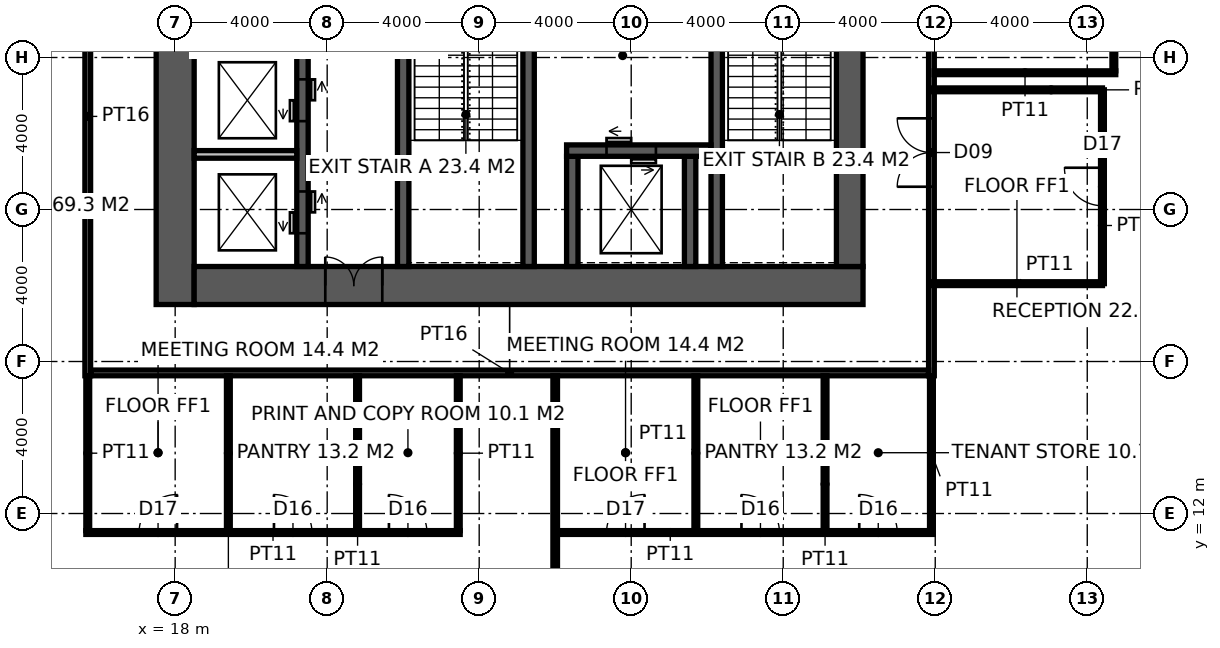
"""IFC4 building model, lengths in metres.
Left out: names, types, materials, properties, quantities, classifications, styles, units other than length and angle.
Written with IfcOpenShell. Run it as: python <this file> out.ifc"""

import sys

from ifc_helpers import new_model, si_unit, direction, frame, frame_2d, origin, place, context, subcontext, project, spatial, rectangle, extrude, element, fill, save


model = new_model("IFC4")
c1 = context("Model", 3, precision=1e-05, world=origin(), true_north=direction((0.0, 1.0)))
c2 = subcontext(c1, "Body", "Model", "MODEL_VIEW")
j1 = project(units=[si_unit("LENGTHUNIT", "METRE"), si_unit("PLANEANGLEUNIT", "RADIAN")], contexts=[c1])
p1 = place(None, origin())
s1 = spatial("IfcSite", under=j1, at=p1, CompositionType="ELEMENT")
p2 = place(p1, origin())
s2 = spatial("IfcBuilding", under=s1, at=p2, CompositionType="ELEMENT")
p3 = place(p2, frame((0.0, 0.0, 93.4)))
s3 = spatial("IfcBuildingStorey", under=s2, at=p3, CompositionType="ELEMENT", Elevation=93.4)
p4 = place(p3, frame((18.0, 17.5, -0.15), z_axis=(0.0, 0.0, 1.0), x_axis=(0.0, 1.0, 0.0)))
e1 = element("IfcWall", 1, at=p4, inside=s3, PredefinedType="SHEAR", context=c2, shape_type="SweptSolid", body=[
    extrude(rectangle(XDim=19.0, YDim=1.0, at=frame_2d((9.5, 0.0))), origin(), (0.0, 0.0, 1.0), 4.0),
])
p5 = place(p3, frame((18.5, 18.0, -0.15), z_axis=(0.0, 0.0, 1.0), x_axis=(1.0, 0.0, 0.0)))
e2 = element("IfcWall", 2, at=p5, inside=s3, PredefinedType="SHEAR", context=c2, shape_type="SweptSolid", body=[
    extrude(rectangle(XDim=17.6, YDim=1.0, at=frame_2d((8.8, 0.0))), origin(), (0.0, 0.0, 1.0), 4.0),
])
p6 = place(p5, frame((3.45, 0.0, 0.15)))
e3 = element("IfcOpeningElement", 3, at=p6, cuts=e2, PredefinedType="OPENING", context=c2, shape_type="SweptSolid", body=[
    extrude(rectangle(XDim=1.5, YDim=2.4, at=frame_2d((0.75, 1.2))), frame((0.0, 0.51, 0.0), z_axis=(0.0, -1.0, 0.0), x_axis=(1.0, 0.0, 0.0)), (0.0, 0.0, 1.0), 1.02),
])
p7 = place(p3, frame((35.75, 18.5, -0.15), z_axis=(0.0, 0.0, 1.0), x_axis=(0.0, 1.0, 0.0)))
e4 = element("IfcWall", 4, at=p7, inside=s3, PredefinedType="SHEAR", context=c2, shape_type="SweptSolid", body=[
    extrude(rectangle(XDim=17.0, YDim=0.7, at=frame_2d((8.5, 0.0))), origin(), (0.0, 0.0, 1.0), 4.0),
])
p8 = place(p7, frame((9.85, 0.0, 0.15)))
e5 = element("IfcOpeningElement", 5, at=p8, cuts=e4, PredefinedType="OPENING", context=c2, shape_type="SweptSolid", body=[
    extrude(rectangle(XDim=1.0, YDim=2.2, at=frame_2d((0.5, 1.1))), frame((0.0, 0.36, 0.0), z_axis=(0.0, -1.0, 0.0), x_axis=(1.0, 0.0, 0.0)), (0.0, 0.0, 1.0), 0.72),
])
p9 = place(p3, frame((24.0, 18.5, -0.15), z_axis=(0.0, 0.0, 1.0), x_axis=(0.0, 1.0, 0.0)))
e6 = element("IfcWall", 6, at=p9, inside=s3, PredefinedType="SHEAR", context=c2, shape_type="SweptSolid", body=[
    extrude(rectangle(XDim=17.0, YDim=0.3, at=frame_2d((8.5, 0.0))), origin(), (0.0, 0.0, 1.0), 4.0),
])
p10 = place(p9, frame((9.6, 0.0, 0.15)))
e7 = element("IfcOpeningElement", 7, at=p10, cuts=e6, PredefinedType="OPENING", context=c2, shape_type="SweptSolid", body=[
    extrude(rectangle(XDim=1.5, YDim=2.4, at=frame_2d((0.75, 1.2))), frame((0.0, 0.16, 0.0), z_axis=(0.0, -1.0, 0.0), x_axis=(1.0, 0.0, 0.0)), (0.0, 0.0, 1.0), 0.32),
])
p11 = place(p3, frame((27.3, 18.5, -0.15), z_axis=(0.0, 0.0, 1.0), x_axis=(0.0, 1.0, 0.0)))
e8 = element("IfcWall", 8, at=p11, inside=s3, PredefinedType="SHEAR", context=c2, shape_type="SweptSolid", body=[
    extrude(rectangle(XDim=7.9, YDim=0.3, at=frame_2d((3.95, 0.0))), origin(), (0.0, 0.0, 1.0), 4.0),
])
p12 = place(p11, frame((6.4, 0.0, 0.15)))
e9 = element("IfcOpeningElement", 9, at=p12, cuts=e8, PredefinedType="OPENING", context=c2, shape_type="SweptSolid", body=[
    extrude(rectangle(XDim=1.0, YDim=2.2, at=frame_2d((0.5, 1.1))), frame((0.0, 0.16, 0.0), z_axis=(0.0, -1.0, 0.0), x_axis=(1.0, 0.0, 0.0)), (0.0, 0.0, 1.0), 0.32),
])
p13 = place(p3, frame((32.25, 18.5, -0.15), z_axis=(0.0, 0.0, 1.0), x_axis=(0.0, 1.0, 0.0)))
e10 = element("IfcWall", 10, at=p13, inside=s3, PredefinedType="SHEAR", context=c2, shape_type="SweptSolid", body=[
    extrude(rectangle(XDim=7.9, YDim=0.3, at=frame_2d((3.95, 0.0))), origin(), (0.0, 0.0, 1.0), 4.0),
])
for number, where, z_axis, x_axis in (
    (11, (28.45, 18.5, -0.15), (0.0, 0.0, 1.0), (0.0, 1.0, 0.0)),
    (12, (31.55, 18.5, -0.15), (0.0, 0.0, 1.0), (0.0, 1.0, 0.0)),
):
    element("IfcWall", number, at=place(p3, frame(where, z_axis=z_axis, x_axis=x_axis)), inside=s3, PredefinedType="SHEAR", context=c2, shape_type="SweptSolid", body=[
        extrude(rectangle(XDim=2.9, YDim=0.3, at=frame_2d((1.45, 0.0))), origin(), (0.0, 0.0, 1.0), 4.0),
    ])
p14 = place(p3, frame((28.3, 21.55, -0.15), z_axis=(0.0, 0.0, 1.0), x_axis=(1.0, 0.0, 0.0)))
e13 = element("IfcWall", 13, at=p14, inside=s3, PredefinedType="SHEAR", context=c2, shape_type="SweptSolid", body=[
    extrude(rectangle(XDim=3.8, YDim=0.3, at=frame_2d((1.9, 0.0))), origin(), (0.0, 0.0, 1.0), 4.0),
])
p15 = place(p14, frame((1.05, 0.0, 0.15)))
e14 = element("IfcOpeningElement", 14, at=p15, cuts=e13, PredefinedType="OPENING", context=c2, shape_type="SweptSolid", body=[
    extrude(rectangle(XDim=1.3, YDim=2.4, at=frame_2d((0.65, 1.2))), frame((0.0, 0.16, 0.0), z_axis=(0.0, -1.0, 0.0), x_axis=(1.0, 0.0, 0.0)), (0.0, 0.0, 1.0), 0.32),
])
p16 = place(p3, frame((21.35, 18.5, -0.15), z_axis=(0.0, 0.0, 1.0), x_axis=(0.0, 1.0, 0.0)))
e15 = element("IfcWall", 15, at=p16, inside=s3, PredefinedType="SHEAR", context=c2, shape_type="SweptSolid", body=[
    extrude(rectangle(XDim=12.5, YDim=0.3, at=frame_2d((6.25, 0.0))), origin(), (0.0, 0.0, 1.0), 4.0),
])
p17 = place(p16, frame((0.875, 0.0, 0.15)))
e16 = element("IfcOpeningElement", 16, at=p17, cuts=e15, PredefinedType="OPENING", context=c2, shape_type="SweptSolid", body=[
    extrude(rectangle(XDim=1.1, YDim=2.2, at=frame_2d((0.55, 1.1))), frame((0.0, 0.16, 0.0), z_axis=(0.0, -1.0, 0.0), x_axis=(1.0, 0.0, 0.0)), (0.0, 0.0, 1.0), 0.32),
])
p18 = place(p16, frame((3.825, 0.0, 0.15)))
e17 = element("IfcOpeningElement", 17, at=p18, cuts=e15, PredefinedType="OPENING", context=c2, shape_type="SweptSolid", body=[
    extrude(rectangle(XDim=1.1, YDim=2.2, at=frame_2d((0.55, 1.1))), frame((0.0, 0.16, 0.0), z_axis=(0.0, -1.0, 0.0), x_axis=(1.0, 0.0, 0.0)), (0.0, 0.0, 1.0), 0.32),
])
p19 = place(p16, frame((6.675, 0.0, 0.15)))
e18 = element("IfcOpeningElement", 18, at=p19, cuts=e15, PredefinedType="OPENING", context=c2, shape_type="SweptSolid", body=[
    extrude(rectangle(XDim=1.1, YDim=2.2, at=frame_2d((0.55, 1.1))), frame((0.0, 0.16, 0.0), z_axis=(0.0, -1.0, 0.0), x_axis=(1.0, 0.0, 0.0)), (0.0, 0.0, 1.0), 0.32),
])
p20 = place(p16, frame((9.575, 0.0, 0.15)))
e19 = element("IfcOpeningElement", 19, at=p20, cuts=e15, PredefinedType="OPENING", context=c2, shape_type="SweptSolid", body=[
    extrude(rectangle(XDim=1.1, YDim=2.2, at=frame_2d((0.55, 1.1))), frame((0.0, 0.16, 0.0), z_axis=(0.0, -1.0, 0.0), x_axis=(1.0, 0.0, 0.0)), (0.0, 0.0, 1.0), 0.32),
])
p21 = place(p3, frame((18.5, 21.45, -0.15), z_axis=(0.0, 0.0, 1.0), x_axis=(1.0, 0.0, 0.0)))
e20 = element("IfcWall", 20, at=p21, inside=s3, PredefinedType="SOLIDWALL", context=c2, shape_type="SweptSolid", body=[
    extrude(rectangle(XDim=2.7, YDim=0.2, at=frame_2d((1.35, 0.0))), origin(), (0.0, 0.0, 1.0), 4.0),
])
p22 = place(p3, frame((15.7, 15.625, 0.0), z_axis=(0.0, 0.0, 1.0), x_axis=(0.0, 1.0, 0.0)))
e21 = element("IfcWall", 21, at=p22, inside=s3, PredefinedType="PARTITIONING", context=c2, shape_type="SweptSolid", body=[
    extrude(rectangle(XDim=22.75, YDim=0.15, at=frame_2d((11.375, 0.0))), origin(), (0.0, 0.0, 1.0), 3.85),
])
p23 = place(p22, frame((10.475, 0.0, 0.0)))
e22 = element("IfcOpeningElement", 22, at=p23, cuts=e21, PredefinedType="OPENING", context=c2, shape_type="SweptSolid", body=[
    extrude(rectangle(XDim=1.8, YDim=2.4, at=frame_2d((0.9, 1.2))), frame((0.0, 0.085, 0.0), z_axis=(0.0, -1.0, 0.0), x_axis=(1.0, 0.0, 0.0)), (0.0, 0.0, 1.0), 0.17),
])
p24 = place(p3, frame((37.9, 15.625, 0.0), z_axis=(0.0, 0.0, 1.0), x_axis=(0.0, 1.0, 0.0)))
e23 = element("IfcWall", 23, at=p24, inside=s3, PredefinedType="PARTITIONING", context=c2, shape_type="SweptSolid", body=[
    extrude(rectangle(XDim=22.75, YDim=0.15, at=frame_2d((11.375, 0.0))), origin(), (0.0, 0.0, 1.0), 2.95),
])
p25 = place(p24, frame((4.974, 0.0, 0.0)))
e24 = element("IfcOpeningElement", 24, at=p25, cuts=e23, PredefinedType="OPENING", context=c2, shape_type="SweptSolid", body=[
    extrude(rectangle(XDim=1.8, YDim=2.4, at=frame_2d((0.9, 1.2))), frame((0.0, 0.085, 0.0), z_axis=(0.0, -1.0, 0.0), x_axis=(1.0, 0.0, 0.0)), (0.0, 0.0, 1.0), 0.17),
])
p26 = place(p24, frame((16.226, 0.0, 0.0)))
e25 = element("IfcOpeningElement", 25, at=p26, cuts=e23, PredefinedType="OPENING", context=c2, shape_type="SweptSolid", body=[
    extrude(rectangle(XDim=1.8, YDim=2.4, at=frame_2d((0.9, 1.2))), frame((0.0, 0.085, 0.0), z_axis=(0.0, -1.0, 0.0), x_axis=(1.0, 0.0, 0.0)), (0.0, 0.0, 1.0), 0.17),
])
p27 = place(p3, frame((15.775, 15.7, 0.0), z_axis=(0.0, 0.0, 1.0), x_axis=(1.0, 0.0, 0.0)))
e26 = element("IfcWall", 26, at=p27, inside=s3, PredefinedType="PARTITIONING", context=c2, shape_type="SweptSolid", body=[
    extrude(rectangle(XDim=22.05, YDim=0.15, at=frame_2d((11.025, 0.0))), origin(), (0.0, 0.0, 1.0), 3.85),
])
p28 = place(p3, frame((28.0, 0.3, 0.0), z_axis=(0.0, 0.0, 1.0), x_axis=(0.0, 1.0, 0.0)))
e27 = element("IfcWall", 27, at=p28, inside=s3, PredefinedType="PARTITIONING", context=c2, shape_type="SweptSolid", body=[
    extrude(rectangle(XDim=15.325, YDim=0.12, at=frame_2d((7.663, 0.0))), origin(), (0.0, 0.0, 1.0), 3.85),
])
p29 = place(p3, frame((15.65, 11.5, 0.0), z_axis=(0.0, 0.0, 1.0), x_axis=(1.0, 0.0, 0.0)))
e28 = element("IfcWall", 28, at=p29, inside=s3, PredefinedType="PARTITIONING", context=c2, shape_type="SweptSolid", body=[
    extrude(rectangle(XDim=9.85, YDim=0.1, at=frame_2d((4.925, 0.0))), origin(), (0.0, 0.0, 1.0), 3.85),
])
p30 = place(p29, frame((1.4, 0.0, 0.0)))
e29 = element("IfcOpeningElement", 29, at=p30, cuts=e28, PredefinedType="OPENING", context=c2, shape_type="SweptSolid", body=[
    extrude(rectangle(XDim=1.0, YDim=2.2, at=frame_2d((0.5, 1.1))), frame((0.0, 0.06, 0.0), z_axis=(0.0, -1.0, 0.0), x_axis=(1.0, 0.0, 0.0)), (0.0, 0.0, 1.0), 0.12),
])
p31 = place(p29, frame((4.95, 0.0, 0.0)))
e30 = element("IfcOpeningElement", 30, at=p31, cuts=e28, PredefinedType="OPENING", context=c2, shape_type="SweptSolid", body=[
    extrude(rectangle(XDim=1.0, YDim=2.2, at=frame_2d((0.5, 1.1))), frame((0.0, 0.06, 0.0), z_axis=(0.0, -1.0, 0.0), x_axis=(1.0, 0.0, 0.0)), (0.0, 0.0, 1.0), 0.12),
])
p32 = place(p29, frame((7.975, 0.0, 0.0)))
e31 = element("IfcOpeningElement", 31, at=p32, cuts=e28, PredefinedType="OPENING", context=c2, shape_type="SweptSolid", body=[
    extrude(rectangle(XDim=1.0, YDim=2.2, at=frame_2d((0.5, 1.1))), frame((0.0, 0.06, 0.0), z_axis=(0.0, -1.0, 0.0), x_axis=(1.0, 0.0, 0.0)), (0.0, 0.0, 1.0), 0.12),
])
p33 = place(p3, frame((28.061, 11.5, 0.0), z_axis=(0.0, 0.0, 1.0), x_axis=(1.0, 0.0, 0.0)))
e32 = element("IfcWall", 32, at=p33, inside=s3, PredefinedType="PARTITIONING", context=c2, shape_type="SweptSolid", body=[
    extrude(rectangle(XDim=9.889, YDim=0.1, at=frame_2d((4.944, 0.0))), origin(), (0.0, 0.0, 1.0), 3.85),
])
p34 = place(p33, frame((1.29, 0.0, 0.0)))
e33 = element("IfcOpeningElement", 33, at=p34, cuts=e32, PredefinedType="OPENING", context=c2, shape_type="SweptSolid", body=[
    extrude(rectangle(XDim=1.0, YDim=2.2, at=frame_2d((0.5, 1.1))), frame((0.0, 0.06, 0.0), z_axis=(0.0, -1.0, 0.0), x_axis=(1.0, 0.0, 0.0)), (0.0, 0.0, 1.0), 0.12),
])
p35 = place(p33, frame((4.84, 0.0, 0.0)))
e34 = element("IfcOpeningElement", 34, at=p35, cuts=e32, PredefinedType="OPENING", context=c2, shape_type="SweptSolid", body=[
    extrude(rectangle(XDim=1.0, YDim=2.2, at=frame_2d((0.5, 1.1))), frame((0.0, 0.06, 0.0), z_axis=(0.0, -1.0, 0.0), x_axis=(1.0, 0.0, 0.0)), (0.0, 0.0, 1.0), 0.12),
])
p36 = place(p33, frame((7.939, 0.0, 0.0)))
e35 = element("IfcOpeningElement", 35, at=p36, cuts=e32, PredefinedType="OPENING", context=c2, shape_type="SweptSolid", body=[
    extrude(rectangle(XDim=1.0, YDim=2.2, at=frame_2d((0.5, 1.1))), frame((0.0, 0.06, 0.0), z_axis=(0.0, -1.0, 0.0), x_axis=(1.0, 0.0, 0.0)), (0.0, 0.0, 1.0), 0.12),
])
p37 = place(p3, frame((37.975, 23.599, 0.0), z_axis=(0.0, 0.0, 1.0), x_axis=(1.0, 0.0, 0.0)))
e36 = element("IfcWall", 36, at=p37, inside=s3, PredefinedType="PARTITIONING", context=c2, shape_type="SweptSolid", body=[
    extrude(rectangle(XDim=4.775, YDim=0.1, at=frame_2d((2.387, 0.0))), origin(), (0.0, 0.0, 1.0), 2.95),
])
for number, where, z_axis, x_axis in (
    (37, (15.7, 11.55, 0.0), (0.0, 0.0, 1.0), (0.0, 1.0, 0.0)),
    (38, (19.4, 11.55, 0.0), (0.0, 0.0, 1.0), (0.0, 1.0, 0.0)),
    (39, (22.8, 11.55, 0.0), (0.0, 0.0, 1.0), (0.0, 1.0, 0.0)),
    (40, (25.45, 11.55, 0.0), (0.0, 0.0, 1.0), (0.0, 1.0, 0.0)),
    (41, (31.701, 11.55, 0.0), (0.0, 0.0, 1.0), (0.0, 1.0, 0.0)),
    (42, (35.101, 11.55, 0.0), (0.0, 0.0, 1.0), (0.0, 1.0, 0.0)),
):
    element("IfcWall", number, at=place(p3, frame(where, z_axis=z_axis, x_axis=x_axis)), inside=s3, PredefinedType="PARTITIONING", context=c2, shape_type="SweptSolid", body=[
        extrude(rectangle(XDim=4.075, YDim=0.1, at=frame_2d((2.038, 0.0))), origin(), (0.0, 0.0, 1.0), 3.85),
    ])
p38 = place(p3, frame((37.9, 11.55, 0.0), z_axis=(0.0, 0.0, 1.0), x_axis=(0.0, 1.0, 0.0)))
e43 = element("IfcWall", 43, at=p38, inside=s3, PredefinedType="PARTITIONING", context=c2, shape_type="SweptSolid", body=[
    extrude(rectangle(XDim=4.075, YDim=0.1, at=frame_2d((2.038, 0.0))), origin(), (0.0, 0.0, 1.0), 2.95),
])
p39 = place(p3, frame((42.7, 23.649, 0.0), z_axis=(0.0, 0.0, 1.0), x_axis=(0.0, 1.0, 0.0)))
e44 = element("IfcWall", 44, at=p39, inside=s3, PredefinedType="PARTITIONING", context=c2, shape_type="SweptSolid", body=[
    extrude(rectangle(XDim=3.54, YDim=0.1, at=frame_2d((1.77, 0.0))), origin(), (0.0, 0.0, 1.0), 3.85),
])
p40 = place(p39, frame((1.275, 0.0, 0.0)))
e45 = element("IfcOpeningElement", 45, at=p40, cuts=e44, PredefinedType="OPENING", context=c2, shape_type="SweptSolid", body=[
    extrude(rectangle(XDim=1.0, YDim=2.2, at=frame_2d((0.5, 1.1))), frame((0.0, 0.06, 0.0), z_axis=(0.0, -1.0, 0.0), x_axis=(1.0, 0.0, 0.0)), (0.0, 0.0, 1.0), 0.12),
])
p41 = place(p3, frame((37.9, 18.049, 0.0), z_axis=(0.0, 0.0, 1.0), x_axis=(1.0, 0.0, 0.0)))
e46 = element("IfcWall", 46, at=p41, inside=s3, PredefinedType="PARTITIONING", context=c2, shape_type="SweptSolid", body=[
    extrude(rectangle(XDim=4.5, YDim=0.1, at=frame_2d((2.25, 0.0))), origin(), (0.0, 0.0, 1.0), 3.85),
])
p42 = place(p3, frame((42.4, 18.049, 0.0), z_axis=(0.0, 0.0, 1.0), x_axis=(0.0, 1.0, 0.0)))
e47 = element("IfcWall", 47, at=p42, inside=s3, PredefinedType="PARTITIONING", context=c2, shape_type="SweptSolid", body=[
    extrude(rectangle(XDim=5.1, YDim=0.1, at=frame_2d((2.55, 0.0))), origin(), (0.0, 0.0, 1.0), 3.85),
])
p43 = place(p42, frame((2.05, 0.0, 0.0)))
e48 = element("IfcOpeningElement", 48, at=p43, cuts=e47, PredefinedType="OPENING", context=c2, shape_type="SweptSolid", body=[
    extrude(rectangle(XDim=1.0, YDim=2.2, at=frame_2d((0.5, 1.1))), frame((0.0, 0.06, 0.0), z_axis=(0.0, -1.0, 0.0), x_axis=(1.0, 0.0, 0.0)), (0.0, 0.0, 1.0), 0.12),
])
p44 = place(p3, frame((42.4, 23.149, 0.0), z_axis=(0.0, 0.0, 1.0), x_axis=(-1.0, 0.0, 0.0)))
e49 = element("IfcWall", 49, at=p44, inside=s3, PredefinedType="PARTITIONING", context=c2, shape_type="SweptSolid", body=[
    extrude(rectangle(XDim=4.5, YDim=0.1, at=frame_2d((2.25, 0.0))), origin(), (0.0, 0.0, 1.0), 3.85),
])
p45 = place(p6, origin())
e50 = element("IfcDoor", 50, at=p45, inside=s3, OperationType="DOUBLE_DOOR_DOUBLE_SWING", PredefinedType="DOOR", context=c2, shape_type="SweptSolid", body=[
    extrude(rectangle(XDim=1.5, YDim=2.4, at=frame_2d((0.75, 1.2))), frame((0.0, 0.025, 0.0), z_axis=(0.0, -1.0, 0.0), x_axis=(1.0, 0.0, 0.0)), (0.0, 0.0, 1.0), 0.05),
])
fill(e3, e50)
p46 = place(p25, origin())
e51 = element("IfcDoor", 51, at=p46, inside=s3, OperationType="DOUBLE_DOOR_DOUBLE_SWING", PredefinedType="DOOR", context=c2, shape_type="SweptSolid", body=[
    extrude(rectangle(XDim=1.8, YDim=2.4, at=frame_2d((0.9, 1.2))), frame((0.0, 0.025, 0.0), z_axis=(0.0, -1.0, 0.0), x_axis=(1.0, 0.0, 0.0)), (0.0, 0.0, 1.0), 0.05),
])
fill(e24, e51)
p47 = place(p30, origin())
e52 = element("IfcDoor", 52, at=p47, inside=s3, OperationType="SINGLE_SWING_RIGHT", PredefinedType="DOOR", context=c2, shape_type="SweptSolid", body=[
    extrude(rectangle(XDim=1.0, YDim=2.2, at=frame_2d((0.5, 1.1))), frame((0.0, 0.025, 0.0), z_axis=(0.0, -1.0, 0.0), x_axis=(1.0, 0.0, 0.0)), (0.0, 0.0, 1.0), 0.05),
])
fill(e29, e52)
p48 = place(p31, origin())
e53 = element("IfcDoor", 53, at=p48, inside=s3, OperationType="SINGLE_SWING_LEFT", PredefinedType="DOOR", context=c2, shape_type="SweptSolid", body=[
    extrude(rectangle(XDim=1.0, YDim=2.2, at=frame_2d((0.5, 1.1))), frame((0.0, 0.025, 0.0), z_axis=(0.0, -1.0, 0.0), x_axis=(1.0, 0.0, 0.0)), (0.0, 0.0, 1.0), 0.05),
])
fill(e30, e53)
p49 = place(p32, origin())
e54 = element("IfcDoor", 54, at=p49, inside=s3, OperationType="SINGLE_SWING_LEFT", PredefinedType="DOOR", context=c2, shape_type="SweptSolid", body=[
    extrude(rectangle(XDim=1.0, YDim=2.2, at=frame_2d((0.5, 1.1))), frame((0.0, 0.025, 0.0), z_axis=(0.0, -1.0, 0.0), x_axis=(1.0, 0.0, 0.0)), (0.0, 0.0, 1.0), 0.05),
])
fill(e31, e54)
p50 = place(p34, origin())
e55 = element("IfcDoor", 55, at=p50, inside=s3, OperationType="SINGLE_SWING_RIGHT", PredefinedType="DOOR", context=c2, shape_type="SweptSolid", body=[
    extrude(rectangle(XDim=1.0, YDim=2.2, at=frame_2d((0.5, 1.1))), frame((0.0, 0.025, 0.0), z_axis=(0.0, -1.0, 0.0), x_axis=(1.0, 0.0, 0.0)), (0.0, 0.0, 1.0), 0.05),
])
fill(e33, e55)
p51 = place(p35, origin())
e56 = element("IfcDoor", 56, at=p51, inside=s3, OperationType="SINGLE_SWING_LEFT", PredefinedType="DOOR", context=c2, shape_type="SweptSolid", body=[
    extrude(rectangle(XDim=1.0, YDim=2.2, at=frame_2d((0.5, 1.1))), frame((0.0, 0.025, 0.0), z_axis=(0.0, -1.0, 0.0), x_axis=(1.0, 0.0, 0.0)), (0.0, 0.0, 1.0), 0.05),
])
fill(e34, e56)
p52 = place(p36, origin())
e57 = element("IfcDoor", 57, at=p52, inside=s3, OperationType="SINGLE_SWING_LEFT", PredefinedType="DOOR", context=c2, shape_type="SweptSolid", body=[
    extrude(rectangle(XDim=1.0, YDim=2.2, at=frame_2d((0.5, 1.1))), frame((0.0, 0.025, 0.0), z_axis=(0.0, -1.0, 0.0), x_axis=(1.0, 0.0, 0.0)), (0.0, 0.0, 1.0), 0.05),
])
fill(e35, e57)
p53 = place(p43, origin())
e58 = element("IfcDoor", 58, at=p53, inside=s3, OperationType="SINGLE_SWING_RIGHT", PredefinedType="DOOR", context=c2, shape_type="SweptSolid", body=[
    extrude(rectangle(XDim=1.0, YDim=2.2, at=frame_2d((0.5, 1.1))), frame((0.0, 0.025, 0.0), z_axis=(0.0, -1.0, 0.0), x_axis=(1.0, 0.0, 0.0)), (0.0, 0.0, 1.0), 0.05),
])
fill(e48, e58)
p54 = place(p15, origin())
e59 = element("IfcDoor", 59, at=p54, inside=s3, OperationType="DOUBLE_DOOR_SLIDING", PredefinedType="DOOR", context=c2, shape_type="SweptSolid", body=[
    extrude(rectangle(XDim=1.3, YDim=2.4, at=frame_2d((0.65, 1.2))), frame((0.0, 0.025, 0.0), z_axis=(0.0, -1.0, 0.0), x_axis=(1.0, 0.0, 0.0)), (0.0, 0.0, 1.0), 0.05),
])
fill(e14, e59)
p55 = place(p17, origin())
e60 = element("IfcDoor", 60, at=p55, inside=s3, OperationType="DOUBLE_DOOR_SLIDING", PredefinedType="DOOR", context=c2, shape_type="SweptSolid", body=[
    extrude(rectangle(XDim=1.1, YDim=2.2, at=frame_2d((0.55, 1.1))), frame((0.0, 0.025, 0.0), z_axis=(0.0, -1.0, 0.0), x_axis=(1.0, 0.0, 0.0)), (0.0, 0.0, 1.0), 0.05),
])
fill(e16, e60)
p56 = place(p18, origin())
e61 = element("IfcDoor", 61, at=p56, inside=s3, OperationType="DOUBLE_DOOR_SLIDING", PredefinedType="DOOR", context=c2, shape_type="SweptSolid", body=[
    extrude(rectangle(XDim=1.1, YDim=2.2, at=frame_2d((0.55, 1.1))), frame((0.0, 0.025, 0.0), z_axis=(0.0, -1.0, 0.0), x_axis=(1.0, 0.0, 0.0)), (0.0, 0.0, 1.0), 0.05),
])
fill(e17, e61)
save(model, sys.argv[1])
